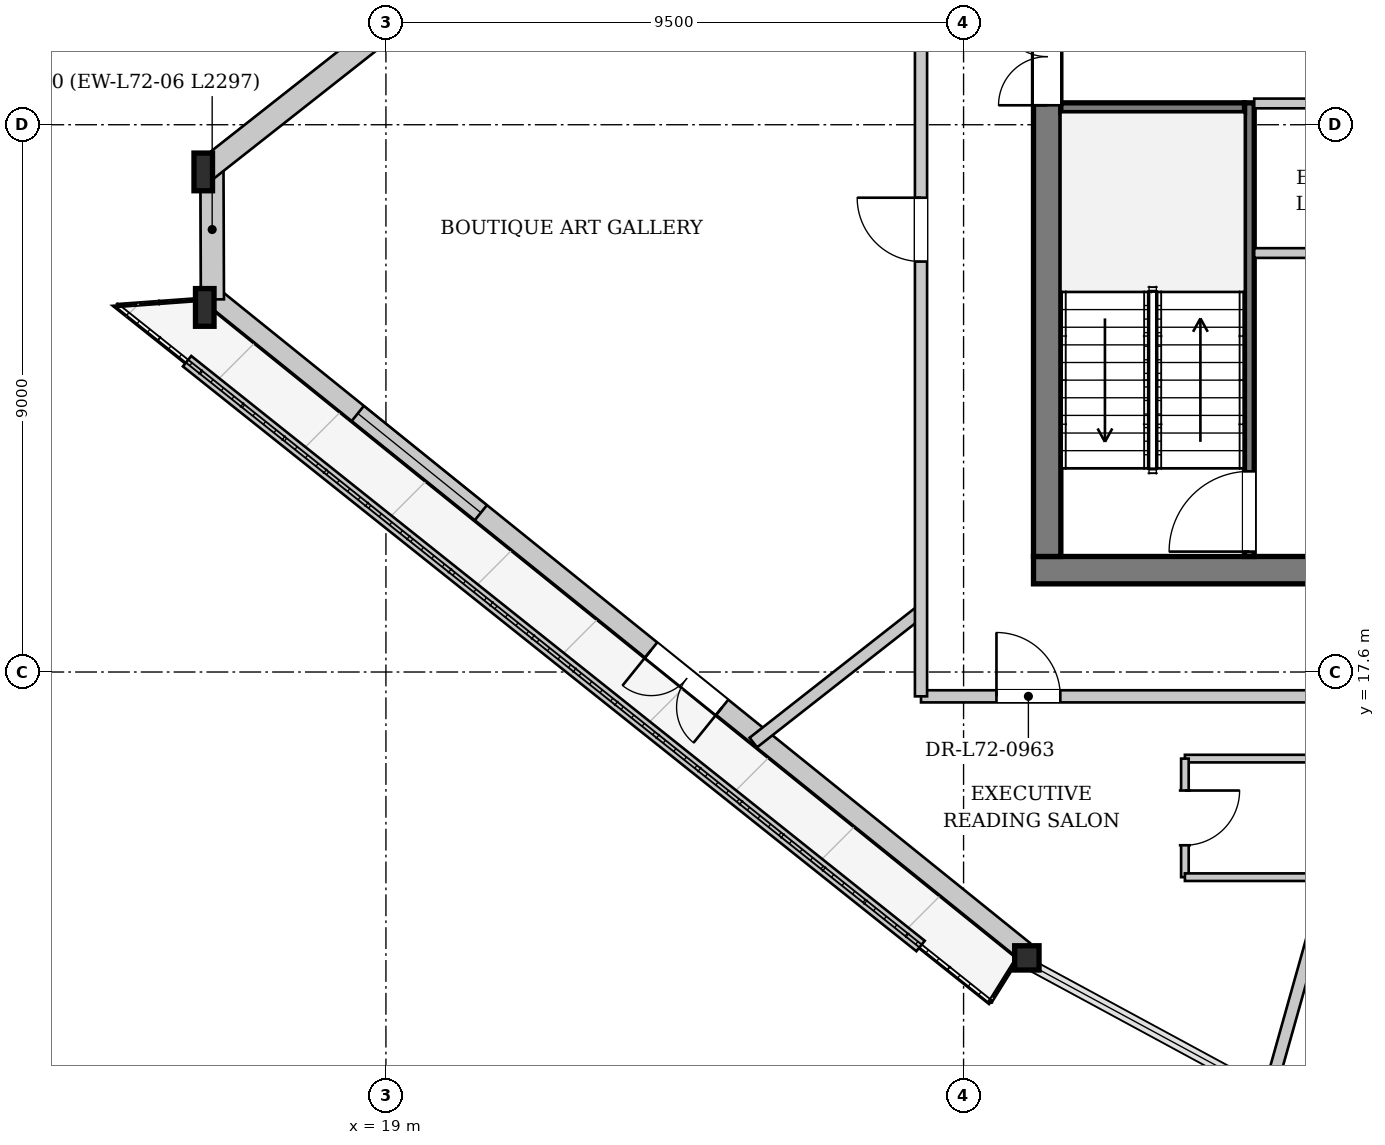
"""IFC4 building model, lengths in metres.
Left out: names, types, materials, properties, quantities, classifications, styles, units other than length and angle.
Written with IfcOpenShell. Run it as: python <this file> out.ifc"""

import sys

from ifc_helpers import new_model, si_unit, direction, frame, frame_2d, origin, origin_2d, place, context, subcontext, project, spatial, rectangle, i_section, extrude, source, transform, mapped, element, fill, save


model = new_model("IFC4")
c1 = context("Model", 3, precision=1e-05, world=origin(), true_north=direction((0.0, 1.0)))
c2 = subcontext(c1, "Body", "Model", "MODEL_VIEW")
j1 = project(units=[si_unit("LENGTHUNIT", "METRE"), si_unit("PLANEANGLEUNIT", "RADIAN")], contexts=[c1])
p1 = place(None, origin())
s1 = spatial("IfcSite", under=j1, at=p1, CompositionType="ELEMENT")
p2 = place(p1, origin())
s2 = spatial("IfcBuilding", under=s1, at=p2, CompositionType="ELEMENT")
p3 = place(p2, frame((0.0, 0.0, 270.5)))
s3 = spatial("IfcBuildingStorey", under=s2, at=p3, CompositionType="ELEMENT", Elevation=270.5)
m1 = source(origin(), c2, "Body", "SweptSolid", [
    extrude(i_section(OverallWidth=0.305, OverallDepth=0.62, WebThickness=0.021, FlangeThickness=0.04, at=origin_2d()), origin(), (0.0, 0.0, 1.0), 3.459),
])
p4 = place(p3, frame((15.948, 26.024, 0.0), z_axis=(0.027310398688, -0.115663419766, 0.992912944548), x_axis=(0.973237757323, 0.229800495475, 0.0)))
e1 = element("IfcColumn", 1, at=p4, inside=s3, PredefinedType="COLUMN", context=c2, shape_type="MappedRepresentation", body=[
    mapped(m1, transform((0.0, 0.0, 0.0), x_axis=(1.0, 0.0, 0.0), y_axis=(0.0, 1.0, 0.0), z_axis=(0.0, 0.0, 1.0), scale=1.0)),
])
m2 = source(origin(), c2, "Body", "SweptSolid", [
    extrude(i_section(OverallWidth=0.305, OverallDepth=0.62, WebThickness=0.021, FlangeThickness=0.04, at=origin_2d()), origin(), (0.0, 0.0, 1.0), 3.448),
])
p5 = place(p3, frame((15.956, 23.727, 0.0), z_axis=(0.037178471964, -0.076410611903, 0.996383048637), x_axis=(0.899208505814, 0.437520357324, 0.0)))
e2 = element("IfcColumn", 2, at=p5, inside=s3, PredefinedType="COLUMN", context=c2, shape_type="MappedRepresentation", body=[
    mapped(m2, transform((0.0, 0.0, 0.0), x_axis=(1.0, 0.0, 0.0), y_axis=(0.0, 1.0, 0.0), z_axis=(0.0, 0.0, 1.0), scale=1.0)),
])
m3 = source(origin(), c2, "Body", "SweptSolid", [
    extrude(i_section(OverallWidth=0.401, OverallDepth=0.399, WebThickness=0.022, FlangeThickness=0.034, at=origin_2d()), origin(), (0.0, 0.0, 1.0), 3.448),
])
p6 = place(p3, frame((29.39, 12.896, 0.0), z_axis=(0.08750935927, 0.001628410407, 0.996162366444), x_axis=(-0.018605193279, 0.999826908411, 0.0)))
e3 = element("IfcColumn", 3, at=p6, inside=s3, PredefinedType="COLUMN", context=c2, shape_type="MappedRepresentation", body=[
    mapped(m3, transform((0.0, 0.0, 0.0), x_axis=(1.0, 0.0, 0.0), y_axis=(0.0, 1.0, 0.0), z_axis=(0.0, 0.0, 1.0), scale=1.0)),
])
p7 = place(p3, frame((29.49, 13.021, 0.0), z_axis=(0.0, 0.0, 1.0), x_axis=(-0.778476594197, 0.627673635169, 0.0)))
e4 = element("IfcWall", 4, at=p7, inside=s3, PredefinedType="SOLIDWALL", context=c2, shape_type="SweptSolid", body=[
    extrude(rectangle(XDim=17.256, YDim=0.32, at=frame_2d((8.628, 0.0))), origin(), (0.0, 0.0, 1.0), 2.872),
])
p8 = place(p7, frame((6.372, 0.0, 0.0)))
e5 = element("IfcOpeningElement", 5, at=p8, cuts=e4, PredefinedType="OPENING", context=c2, shape_type="SweptSolid", body=[
    extrude(rectangle(XDim=1.5, YDim=2.3, at=frame_2d((0.75, 1.15))), frame((0.0, 0.17, 0.0), z_axis=(0.0, -1.0, 0.0), x_axis=(1.0, 0.0, 0.0)), (0.0, 0.0, 1.0), 0.34),
])
p9 = place(p7, frame((11.47, 0.0, 0.402)))
e6 = element("IfcOpeningElement", 6, at=p9, cuts=e4, PredefinedType="OPENING", context=c2, shape_type="SweptSolid", body=[
    extrude(rectangle(XDim=2.6, YDim=2.35, at=frame_2d((1.3, 1.175))), frame((0.0, 0.17, 0.0), z_axis=(0.0, -1.0, 0.0), x_axis=(1.0, 0.0, 0.0)), (0.0, 0.0, 1.0), 0.34),
])
p10 = place(p3, frame((16.146, 23.728, 0.0), z_axis=(0.0, 0.0, 1.0), x_axis=(-0.003507631483, 0.999993848242, 0.0)))
e7 = element("IfcWall", 7, at=p10, inside=s3, PredefinedType="SOLIDWALL", context=c2, shape_type="SweptSolid", body=[
    extrude(rectangle(XDim=2.297, YDim=0.38, at=frame_2d((1.148, 0.0))), origin(), (0.0, 0.0, 1.0), 2.872),
])
p11 = place(p3, frame((16.066, 25.875, 0.0), z_axis=(0.0, 0.0, 1.0), x_axis=(0.785693730349, 0.61861568206, 0.0)))
e8 = element("IfcWall", 8, at=p11, inside=s3, PredefinedType="SOLIDWALL", context=c2, shape_type="SweptSolid", body=[
    extrude(rectangle(XDim=21.675, YDim=0.38, at=frame_2d((10.837, 0.0))), origin(), (0.0, 0.0, 1.0), 2.872),
])
p12 = place(p11, frame((4.969, 0.0, 0.502)))
e9 = element("IfcOpeningElement", 9, at=p12, cuts=e8, PredefinedType="OPENING", context=c2, shape_type="SweptSolid", body=[
    extrude(rectangle(XDim=2.2, YDim=2.25, at=frame_2d((1.1, 1.125))), frame((0.0, 0.2, 0.0), z_axis=(0.0, -1.0, 0.0), x_axis=(1.0, 0.0, 0.0)), (0.0, 0.0, 1.0), 0.4),
])
p13 = place(p11, frame((17.506, 0.0, 0.502)))
e10 = element("IfcOpeningElement", 10, at=p13, cuts=e8, PredefinedType="OPENING", context=c2, shape_type="SweptSolid", body=[
    extrude(rectangle(XDim=2.2, YDim=2.25, at=frame_2d((1.1, 1.125))), frame((0.0, 0.2, 0.0), z_axis=(0.0, -1.0, 0.0), x_axis=(1.0, 0.0, 0.0)), (0.0, 0.0, 1.0), 0.4),
])
p14 = place(p3, frame((15.729, 22.711, 0.0), z_axis=(0.0, 0.0, 1.0), x_axis=(0.781937578539, -0.623356738368, 0.0)))
e11 = element("IfcWall", 11, at=p14, inside=s3, PredefinedType="PARAPET", context=c2, shape_type="SweptSolid", body=[
    extrude(rectangle(XDim=15.428, YDim=0.22, at=frame_2d((7.714, 0.0))), origin(), (0.0, 0.0, 1.0), 0.3),
])
p15 = place(p3, frame((46.35, 19.275, 0.0), z_axis=(0.0, 0.0, 1.0), x_axis=(-1.0, 0.0, 0.0)))
e12 = element("IfcWall", 12, at=p15, inside=s3, PredefinedType="SHEAR", context=c2, shape_type="SweptSolid", body=[
    extrude(rectangle(XDim=16.7, YDim=0.45, at=frame_2d((8.35, 0.0))), origin(), (0.0, 0.0, 1.0), 3.38),
])
p16 = place(p15, frame((4.55, 0.0, 0.0)))
e13 = element("IfcOpeningElement", 13, at=p16, cuts=e12, PredefinedType="OPENING", context=c2, shape_type="SweptSolid", body=[
    extrude(rectangle(XDim=1.12, YDim=2.25, at=frame_2d((0.56, 1.125))), frame((0.0, 0.235, 0.0), z_axis=(0.0, -1.0, 0.0), x_axis=(1.0, 0.0, 0.0)), (0.0, 0.0, 1.0), 0.47),
])
p17 = place(p15, frame((11.05, 0.0, 0.0)))
e14 = element("IfcOpeningElement", 14, at=p17, cuts=e12, PredefinedType="OPENING", context=c2, shape_type="SweptSolid", body=[
    extrude(rectangle(XDim=1.12, YDim=2.25, at=frame_2d((0.56, 1.125))), frame((0.0, 0.235, 0.0), z_axis=(0.0, -1.0, 0.0), x_axis=(1.0, 0.0, 0.0)), (0.0, 0.0, 1.0), 0.47),
])
p18 = place(p3, frame((29.875, 19.5, 0.0), z_axis=(0.0, 0.0, 1.0), x_axis=(0.0, 1.0, 0.0)))
e15 = element("IfcWall", 15, at=p18, inside=s3, PredefinedType="SHEAR", context=c2, shape_type="SweptSolid", body=[
    extrude(rectangle(XDim=14.2, YDim=0.45, at=frame_2d((7.1, 0.0))), origin(), (0.0, 0.0, 1.0), 3.38),
])
p19 = place(p18, frame((7.42, 0.0, 0.0)))
e16 = element("IfcOpeningElement", 16, at=p19, cuts=e15, PredefinedType="OPENING", context=c2, shape_type="SweptSolid", body=[
    extrude(rectangle(XDim=1.6, YDim=2.2, at=frame_2d((0.8, 1.1))), frame((0.0, 0.235, 0.0), z_axis=(0.0, -1.0, 0.0), x_axis=(1.0, 0.0, 0.0)), (0.0, 0.0, 1.0), 0.47),
])
p20 = place(p3, frame((33.2, 19.5, 0.0), z_axis=(0.0, 0.0, 1.0), x_axis=(0.0, 1.0, 0.0)))
e17 = element("IfcWall", 17, at=p20, inside=s3, PredefinedType="PARTITIONING", context=c2, shape_type="SweptSolid", body=[
    extrude(rectangle(XDim=7.46, YDim=0.16, at=frame_2d((3.73, 0.0))), origin(), (0.0, 0.0, 1.0), 3.38),
])
p21 = place(p20, frame((0.08, 0.0, 0.0)))
e18 = element("IfcOpeningElement", 18, at=p21, cuts=e17, PredefinedType="OPENING", context=c2, shape_type="SweptSolid", body=[
    extrude(rectangle(XDim=1.32, YDim=2.2, at=frame_2d((0.66, 1.1))), frame((0.0, 0.09, 0.0), z_axis=(0.0, -1.0, 0.0), x_axis=(1.0, 0.0, 0.0)), (0.0, 0.0, 1.0), 0.18),
])
p22 = place(p3, frame((30.1, 26.88, 0.0), z_axis=(0.0, 0.0, 1.0), x_axis=(1.0, 0.0, 0.0)))
e19 = element("IfcWall", 19, at=p22, inside=s3, PredefinedType="PARTITIONING", context=c2, shape_type="SweptSolid", body=[
    extrude(rectangle(XDim=3.02, YDim=0.16, at=frame_2d((1.51, 0.0))), origin(), (0.0, 0.0, 1.0), 3.38),
])
p23 = place(p3, frame((33.28, 24.49, 0.0), z_axis=(0.0, 0.0, 1.0), x_axis=(1.0, 0.0, 0.0)))
e20 = element("IfcWall", 20, at=p23, inside=s3, PredefinedType="PARTITIONING", context=c2, shape_type="SweptSolid", body=[
    extrude(rectangle(XDim=9.44, YDim=0.16, at=frame_2d((4.72, 0.0))), origin(), (0.0, 0.0, 1.0), 3.38),
])
p24 = place(p3, frame((33.28, 26.95, 0.0), z_axis=(0.0, 0.0, 1.0), x_axis=(1.0, 0.0, 0.0)))
e21 = element("IfcWall", 21, at=p24, inside=s3, PredefinedType="PARTITIONING", context=c2, shape_type="SweptSolid", body=[
    extrude(rectangle(XDim=9.44, YDim=0.16, at=frame_2d((4.72, 0.0))), origin(), (0.0, 0.0, 1.0), 3.38),
])
p25 = place(p24, frame((1.2, 0.0, 0.0)))
e22 = element("IfcOpeningElement", 22, at=p25, cuts=e21, PredefinedType="OPENING", context=c2, shape_type="SweptSolid", body=[
    extrude(rectangle(XDim=0.95, YDim=2.1, at=frame_2d((0.475, 1.05))), frame((0.0, 0.09, 0.0), z_axis=(0.0, -1.0, 0.0), x_axis=(1.0, 0.0, 0.0)), (0.0, 0.0, 1.0), 0.18),
])
p26 = place(p24, frame((4.65, 0.0, 0.0)))
e23 = element("IfcOpeningElement", 23, at=p26, cuts=e21, PredefinedType="OPENING", context=c2, shape_type="SweptSolid", body=[
    extrude(rectangle(XDim=0.95, YDim=2.1, at=frame_2d((0.475, 1.05))), frame((0.0, 0.09, 0.0), z_axis=(0.0, -1.0, 0.0), x_axis=(1.0, 0.0, 0.0)), (0.0, 0.0, 1.0), 0.18),
])
p27 = place(p24, frame((7.67, 0.0, 0.0)))
e24 = element("IfcOpeningElement", 24, at=p27, cuts=e21, PredefinedType="OPENING", context=c2, shape_type="SweptSolid", body=[
    extrude(rectangle(XDim=1.1, YDim=2.2, at=frame_2d((0.55, 1.1))), frame((0.0, 0.09, 0.0), z_axis=(0.0, -1.0, 0.0), x_axis=(1.0, 0.0, 0.0)), (0.0, 0.0, 1.0), 0.18),
])
p28 = place(p3, frame((35.358, 17.2, 0.0), z_axis=(0.0, 0.0, 1.0), x_axis=(-0.270598132861, -0.962692396611, 0.0)))
e25 = element("IfcWall", 25, at=p28, inside=s3, PredefinedType="PARTITIONING", context=c2, shape_type="SweptSolid", body=[
    extrude(rectangle(XDim=6.761, YDim=0.2, at=frame_2d((3.381, 0.0))), origin(), (0.0, 0.0, 1.0), 3.38),
])
p29 = place(p3, frame((27.8, 18.603, 0.0), z_axis=(0.0, 0.0, 1.0), x_axis=(-0.786941631294, -0.617027445854, 0.0)))
e26 = element("IfcWall", 26, at=p29, inside=s3, PredefinedType="PARTITIONING", context=c2, shape_type="SweptSolid", body=[
    extrude(rectangle(XDim=3.504, YDim=0.2, at=frame_2d((1.752, 0.0))), origin(), (0.0, 0.0, 1.0), 3.38),
])
p30 = place(p3, frame((34.24, 16.176, 0.0), z_axis=(0.0, 0.0, 1.0), x_axis=(-1.0, 0.0, 0.0)))
e27 = element("IfcWall", 27, at=p30, inside=s3, PredefinedType="PARTITIONING", context=c2, shape_type="SweptSolid", body=[
    extrude(rectangle(XDim=2.1, YDim=0.125, at=frame_2d((1.05, 0.0))), origin(), (0.0, 0.0, 1.0), 3.38),
])
p31 = place(p3, frame((32.14, 16.176, 0.0), z_axis=(0.0, 0.0, 1.0), x_axis=(0.0, -1.0, 0.0)))
e28 = element("IfcWall", 28, at=p31, inside=s3, PredefinedType="PARTITIONING", context=c2, shape_type="SweptSolid", body=[
    extrude(rectangle(XDim=1.95, YDim=0.125, at=frame_2d((0.975, 0.0))), origin(), (0.0, 0.0, 1.0), 3.38),
])
p32 = place(p31, frame((0.525, 0.0, 0.0)))
e29 = element("IfcOpeningElement", 29, at=p32, cuts=e28, PredefinedType="OPENING", context=c2, shape_type="SweptSolid", body=[
    extrude(rectangle(XDim=0.9, YDim=2.1, at=frame_2d((0.45, 1.05))), frame((0.0, 0.073, 0.0), z_axis=(0.0, -1.0, 0.0), x_axis=(1.0, 0.0, 0.0)), (0.0, 0.0, 1.0), 0.145),
])
p33 = place(p3, frame((32.14, 14.226, 0.0), z_axis=(0.0, 0.0, 1.0), x_axis=(1.0, 0.0, 0.0)))
e30 = element("IfcWall", 30, at=p33, inside=s3, PredefinedType="PARTITIONING", context=c2, shape_type="SweptSolid", body=[
    extrude(rectangle(XDim=2.1, YDim=0.125, at=frame_2d((1.05, 0.0))), origin(), (0.0, 0.0, 1.0), 3.38),
])
p34 = place(p3, frame((27.8, 17.2, 0.0), z_axis=(0.0, 0.0, 1.0), x_axis=(1.0, 0.0, 0.0)))
e31 = element("IfcWall", 31, at=p34, inside=s3, PredefinedType="PARTITIONING", context=c2, shape_type="SweptSolid", body=[
    extrude(rectangle(XDim=20.4, YDim=0.2, at=frame_2d((10.2, 0.0))), origin(), (0.0, 0.0, 1.0), 3.38),
])
p35 = place(p34, frame((14.378, 0.0, 0.0)))
e32 = element("IfcOpeningElement", 32, at=p35, cuts=e31, PredefinedType="OPENING", context=c2, shape_type="SweptSolid", body=[
    extrude(rectangle(XDim=1.05, YDim=2.2, at=frame_2d((0.525, 1.1))), frame((0.0, 0.11, 0.0), z_axis=(0.0, -1.0, 0.0), x_axis=(1.0, 0.0, 0.0)), (0.0, 0.0, 1.0), 0.22),
])
p36 = place(p34, frame((19.05, 0.0, 0.0)))
e33 = element("IfcOpeningElement", 33, at=p36, cuts=e31, PredefinedType="OPENING", context=c2, shape_type="SweptSolid", body=[
    extrude(rectangle(XDim=1.05, YDim=2.2, at=frame_2d((0.525, 1.1))), frame((0.0, 0.11, 0.0), z_axis=(0.0, -1.0, 0.0), x_axis=(1.0, 0.0, 0.0)), (0.0, 0.0, 1.0), 0.22),
])
p37 = place(p34, frame((1.241, 0.0, 0.0)))
e34 = element("IfcOpeningElement", 34, at=p37, cuts=e31, PredefinedType="OPENING", context=c2, shape_type="SweptSolid", body=[
    extrude(rectangle(XDim=1.05, YDim=2.2, at=frame_2d((0.525, 1.1))), frame((0.0, 0.11, 0.0), z_axis=(0.0, -1.0, 0.0), x_axis=(1.0, 0.0, 0.0)), (0.0, 0.0, 1.0), 0.22),
])
p38 = place(p3, frame((27.8, 17.2, 0.0), z_axis=(0.0, 0.0, 1.0), x_axis=(0.0, 1.0, 0.0)))
e35 = element("IfcWall", 35, at=p38, inside=s3, PredefinedType="PARTITIONING", context=c2, shape_type="SweptSolid", body=[
    extrude(rectangle(XDim=18.118, YDim=0.2, at=frame_2d((9.059, 0.0))), origin(), (0.0, 0.0, 1.0), 3.38),
])
p39 = place(p38, frame((7.15, 0.0, 0.0)))
e36 = element("IfcOpeningElement", 36, at=p39, cuts=e35, PredefinedType="OPENING", context=c2, shape_type="SweptSolid", body=[
    extrude(rectangle(XDim=1.05, YDim=2.2, at=frame_2d((0.525, 1.1))), frame((0.0, 0.11, 0.0), z_axis=(0.0, -1.0, 0.0), x_axis=(1.0, 0.0, 0.0)), (0.0, 0.0, 1.0), 0.22),
])
m4 = source(origin(), c2, "Body", "SweptSolid", [
    extrude(rectangle(XDim=1.5, YDim=2.3, at=frame_2d((0.75, 1.15))), frame((0.0, 0.025, 0.0), z_axis=(0.0, -1.0, 0.0), x_axis=(1.0, 0.0, 0.0)), (0.0, 0.0, 1.0), 0.05),
])
p40 = place(p8, origin())
e37 = element("IfcDoor", 37, at=p40, inside=s3, OperationType="DOUBLE_DOOR_SINGLE_SWING", PredefinedType="DOOR", context=c2, shape_type="MappedRepresentation", body=[
    mapped(m4, transform((0.0, 0.0, 0.0), x_axis=(1.0, 0.0, 0.0), y_axis=(0.0, 1.0, 0.0), z_axis=(0.0, 0.0, 1.0), scale=1.0)),
])
fill(e5, e37)
m5 = source(origin(), c2, "Body", "SweptSolid", [
    extrude(rectangle(XDim=2.6, YDim=2.35, at=frame_2d((1.3, 1.175))), frame((0.0, 0.03, 0.0), z_axis=(0.0, -1.0, 0.0), x_axis=(1.0, 0.0, 0.0)), (0.0, 0.0, 1.0), 0.06),
])
p41 = place(p9, origin())
e38 = element("IfcWindow", 38, at=p41, inside=s3, PartitioningType="SINGLE_PANEL", PredefinedType="WINDOW", context=c2, shape_type="MappedRepresentation", body=[
    mapped(m5, transform((0.0, 0.0, 0.0), x_axis=(1.0, 0.0, 0.0), y_axis=(0.0, 1.0, 0.0), z_axis=(0.0, 0.0, 1.0), scale=1.0)),
])
fill(e6, e38)
m6 = source(origin(), c2, "Body", "SweptSolid", [
    extrude(rectangle(XDim=1.6, YDim=2.2, at=frame_2d((0.8, 1.1))), frame((0.0, 0.025, 0.0), z_axis=(0.0, -1.0, 0.0), x_axis=(1.0, 0.0, 0.0)), (0.0, 0.0, 1.0), 0.05),
])
p42 = place(p19, origin())
e39 = element("IfcDoor", 39, at=p42, inside=s3, OperationType="DOUBLE_DOOR_SINGLE_SWING", PredefinedType="DOOR", context=c2, shape_type="MappedRepresentation", body=[
    mapped(m6, transform((0.0, 0.0, 0.0), x_axis=(1.0, 0.0, 0.0), y_axis=(0.0, 1.0, 0.0), z_axis=(0.0, 0.0, 1.0), scale=1.0)),
])
fill(e16, e39)
m7 = source(origin(), c2, "Body", "SweptSolid", [
    extrude(rectangle(XDim=1.32, YDim=2.2, at=frame_2d((0.66, 1.1))), frame((0.0, 0.025, 0.0), z_axis=(0.0, -1.0, 0.0), x_axis=(1.0, 0.0, 0.0)), (0.0, 0.0, 1.0), 0.05),
])
p43 = place(p21, origin())
e40 = element("IfcDoor", 40, at=p43, inside=s3, OperationType="SINGLE_SWING_LEFT", PredefinedType="DOOR", context=c2, shape_type="MappedRepresentation", body=[
    mapped(m7, transform((0.0, 0.0, 0.0), x_axis=(1.0, 0.0, 0.0), y_axis=(0.0, 1.0, 0.0), z_axis=(0.0, 0.0, 1.0), scale=1.0)),
])
fill(e18, e40)
m8 = source(origin(), c2, "Body", "SweptSolid", [
    extrude(rectangle(XDim=0.9, YDim=2.1, at=frame_2d((0.45, 1.05))), frame((0.0, 0.025, 0.0), z_axis=(0.0, -1.0, 0.0), x_axis=(1.0, 0.0, 0.0)), (0.0, 0.0, 1.0), 0.05),
])
p44 = place(p32, origin())
e41 = element("IfcDoor", 41, at=p44, inside=s3, OperationType="SINGLE_SWING_LEFT", PredefinedType="DOOR", context=c2, shape_type="MappedRepresentation", body=[
    mapped(m8, transform((0.0, 0.0, 0.0), x_axis=(1.0, 0.0, 0.0), y_axis=(0.0, 1.0, 0.0), z_axis=(0.0, 0.0, 1.0), scale=1.0)),
])
fill(e29, e41)
m9 = source(origin(), c2, "Body", "SweptSolid", [
    extrude(rectangle(XDim=1.05, YDim=2.2, at=frame_2d((0.525, 1.1))), frame((0.0, 0.025, 0.0), z_axis=(0.0, -1.0, 0.0), x_axis=(1.0, 0.0, 0.0)), (0.0, 0.0, 1.0), 0.05),
])
p45 = place(p37, origin())
e42 = element("IfcDoor", 42, at=p45, inside=s3, OperationType="SINGLE_SWING_LEFT", PredefinedType="DOOR", context=c2, shape_type="MappedRepresentation", body=[
    mapped(m9, transform((0.0, 0.0, 0.0), x_axis=(1.0, 0.0, 0.0), y_axis=(0.0, 1.0, 0.0), z_axis=(0.0, 0.0, 1.0), scale=1.0)),
])
fill(e34, e42)
p46 = place(p39, origin())
e43 = element("IfcDoor", 43, at=p46, inside=s3, OperationType="SINGLE_SWING_RIGHT", PredefinedType="DOOR", context=c2, shape_type="MappedRepresentation", body=[
    mapped(m9, transform((0.0, 0.0, 0.0), x_axis=(1.0, 0.0, 0.0), y_axis=(0.0, 1.0, 0.0), z_axis=(0.0, 0.0, 1.0), scale=1.0)),
])
fill(e36, e43)
save(model, sys.argv[1])
